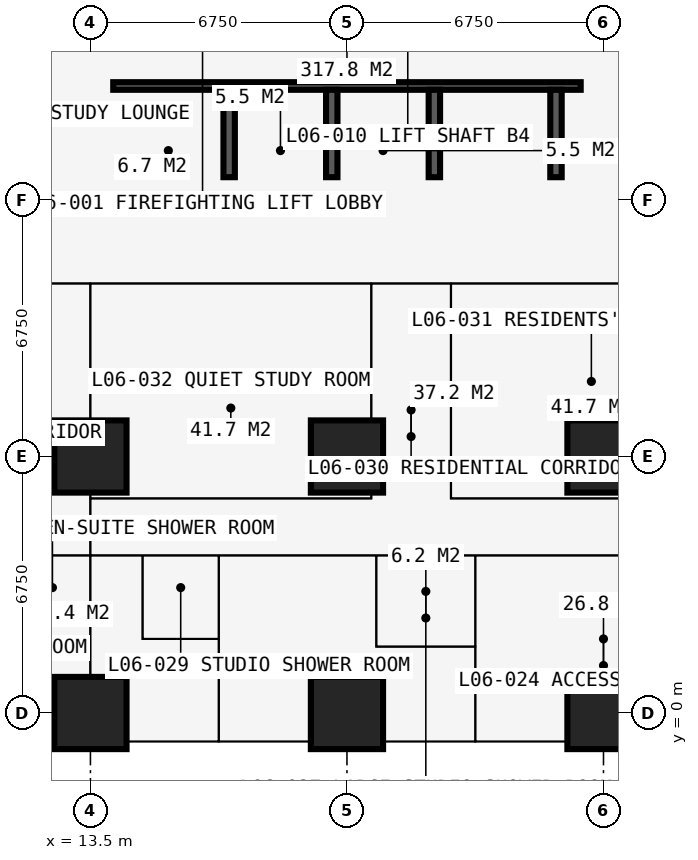
"""IFC4 building model, lengths in metres.
Left out: names, types, materials, properties, quantities, classifications, styles, units other than length and angle.
Written with IfcOpenShell. Run it as: python <this file> out.ifc"""

import sys

from ifc_helpers import new_model, si_unit, direction, frame, frame_2d, origin, origin_2d, place, context, subcontext, project, spatial, rectangle, extrude, element, fill, save


model = new_model("IFC4")
c1 = context("Model", 3, precision=1e-05, world=origin(), true_north=direction((0.0, 1.0)))
c2 = subcontext(c1, "Body", "Model", "MODEL_VIEW")
j1 = project(units=[si_unit("LENGTHUNIT", "METRE"), si_unit("PLANEANGLEUNIT", "RADIAN")], contexts=[c1])
p1 = place(None, origin())
s1 = spatial("IfcSite", under=j1, at=p1, CompositionType="ELEMENT")
p2 = place(p1, origin())
s2 = spatial("IfcBuilding", under=s1, at=p2, CompositionType="ELEMENT")
p3 = place(p2, frame((0.0, 0.0, 25.2)))
s3 = spatial("IfcBuildingStorey", under=s2, at=p3, CompositionType="ELEMENT", Elevation=25.2)
for number, where, z_axis, x_axis in (
    (1, (13.5, 0.0, 0.0), (0.0, 0.0, 1.0), (1.0, 0.0, 0.0)),
    (2, (13.5, 6.75, 0.0), (0.0, 0.0, 1.0), (1.0, 0.0, 0.0)),
    (3, (20.25, 0.0, 0.0), (0.0, 0.0, 1.0), (1.0, 0.0, 0.0)),
    (4, (20.25, 6.75, 0.0), (0.0, 0.0, 1.0), (1.0, 0.0, 0.0)),
    (5, (27.0, 0.0, 0.0), (0.0, 0.0, 1.0), (1.0, 0.0, 0.0)),
    (6, (27.0, 6.75, 0.0), (0.0, 0.0, 1.0), (1.0, 0.0, 0.0)),
):
    element("IfcColumn", number, at=place(p3, frame(where, z_axis=z_axis, x_axis=x_axis)), inside=s3, PredefinedType="COLUMN", context=c2, shape_type="SweptSolid", body=[
        extrude(rectangle(XDim=1.9, YDim=1.9, at=origin_2d()), origin(), (0.0, 0.0, 1.0), 3.6),
    ])
p4 = place(p3, frame((12.9, 13.5, 0.0), z_axis=(0.0, 0.0, 1.0), x_axis=(1.0, 0.0, 0.0)))
e7 = element("IfcWall", 7, at=p4, inside=s3, PredefinedType="SHEAR", context=c2, shape_type="SweptSolid", body=[
    extrude(rectangle(XDim=14.7, YDim=1.2, at=frame_2d((7.35, 0.0))), origin(), (0.0, 0.0, 1.0), 3.6),
])
p5 = place(p3, frame((27.0, 14.1, 0.0), z_axis=(0.0, 0.0, 1.0), x_axis=(0.0, 1.0, 0.0)))
e8 = element("IfcWall", 8, at=p5, inside=s3, PredefinedType="SHEAR", context=c2, shape_type="SweptSolid", body=[
    extrude(rectangle(XDim=12.3, YDim=1.2, at=frame_2d((6.15, 0.0))), origin(), (0.0, 0.0, 1.0), 3.6),
])
p6 = place(p5, frame((3.65, 0.0, 0.0)))
e9 = element("IfcOpeningElement", 9, at=p6, cuts=e8, PredefinedType="OPENING", context=c2, shape_type="SweptSolid", body=[
    extrude(rectangle(XDim=1.2, YDim=2.2, at=frame_2d((0.6, 1.1))), frame((0.0, 0.61, 0.0), z_axis=(0.0, -1.0, 0.0), x_axis=(1.0, 0.0, 0.0)), (0.0, 0.0, 1.0), 1.22),
])
p7 = place(p3, frame((13.5, 26.4, 0.0), z_axis=(0.0, 0.0, 1.0), x_axis=(0.0, -1.0, 0.0)))
e10 = element("IfcWall", 10, at=p7, inside=s3, PredefinedType="SHEAR", context=c2, shape_type="SweptSolid", body=[
    extrude(rectangle(XDim=12.3, YDim=1.2, at=frame_2d((6.15, 0.0))), origin(), (0.0, 0.0, 1.0), 3.6),
])
p8 = place(p7, frame((7.45, 0.0, 0.0)))
e11 = element("IfcOpeningElement", 11, at=p8, cuts=e10, PredefinedType="OPENING", context=c2, shape_type="SweptSolid", body=[
    extrude(rectangle(XDim=1.2, YDim=2.2, at=frame_2d((0.6, 1.1))), frame((0.0, 0.61, 0.0), z_axis=(0.0, -1.0, 0.0), x_axis=(1.0, 0.0, 0.0)), (0.0, 0.0, 1.0), 1.22),
])
p9 = place(p3, frame((20.25, -0.75, 0.0), z_axis=(0.0, 0.0, 1.0), x_axis=(-1.0, 0.0, 0.0)))
e12 = element("IfcWall", 12, at=p9, inside=s3, PredefinedType="SOLIDWALL", context=c2, shape_type="SweptSolid", body=[
    extrude(rectangle(XDim=6.75, YDim=0.15, at=frame_2d((3.375, 0.0))), origin(), (0.0, 0.0, 1.0), 3.375),
])
p10 = place(p9, frame((0.996, 0.0, 0.0)))
e13 = element("IfcOpeningElement", 13, at=p10, cuts=e12, PredefinedType="OPENING", context=c2, shape_type="SweptSolid", body=[
    extrude(rectangle(XDim=1.0, YDim=2.2, at=frame_2d((0.5, 1.1))), frame((0.0, 0.085, 0.0), z_axis=(0.0, -1.0, 0.0), x_axis=(1.0, 0.0, 0.0)), (0.0, 0.0, 1.0), 0.17),
])
p11 = place(p9, frame((2.042, 0.0, 0.9)))
e14 = element("IfcOpeningElement", 14, at=p11, cuts=e12, PredefinedType="OPENING", context=c2, shape_type="SweptSolid", body=[
    extrude(rectangle(XDim=1.2, YDim=1.8, at=frame_2d((0.6, 0.9))), frame((0.0, 0.085, 0.0), z_axis=(0.0, -1.0, 0.0), x_axis=(1.0, 0.0, 0.0)), (0.0, 0.0, 1.0), 0.17),
])
p12 = place(p9, frame((4.754, 0.0, 0.0)))
e15 = element("IfcOpeningElement", 15, at=p12, cuts=e12, PredefinedType="OPENING", context=c2, shape_type="SweptSolid", body=[
    extrude(rectangle(XDim=1.0, YDim=2.2, at=frame_2d((0.5, 1.1))), frame((0.0, 0.085, 0.0), z_axis=(0.0, -1.0, 0.0), x_axis=(1.0, 0.0, 0.0)), (0.0, 0.0, 1.0), 0.17),
])
p13 = place(p9, frame((3.508, 0.0, 0.9)))
e16 = element("IfcOpeningElement", 16, at=p13, cuts=e12, PredefinedType="OPENING", context=c2, shape_type="SweptSolid", body=[
    extrude(rectangle(XDim=1.2, YDim=1.8, at=frame_2d((0.6, 0.9))), frame((0.0, 0.085, 0.0), z_axis=(0.0, -1.0, 0.0), x_axis=(1.0, 0.0, 0.0)), (0.0, 0.0, 1.0), 0.17),
])
p14 = place(p3, frame((16.875, -0.85, 0.0), z_axis=(0.0, 0.0, 1.0), x_axis=(0.0, -1.0, 0.0)))
e17 = element("IfcWall", 17, at=p14, inside=s3, PredefinedType="USERDEFINED", context=c2, shape_type="SweptSolid", body=[
    extrude(rectangle(XDim=2.2, YDim=1.0, at=frame_2d((1.1, 0.0))), origin(), (0.0, 0.0, 1.0), 0.9),
])
p15 = place(p3, frame((14.1, 16.5, 0.0), z_axis=(0.0, 0.0, 1.0), x_axis=(1.0, 0.0, 0.0)))
e18 = element("IfcWall", 18, at=p15, inside=s3, PredefinedType="SHEAR", context=c2, shape_type="SweptSolid", body=[
    extrude(rectangle(XDim=12.3, YDim=0.2, at=frame_2d((6.15, 0.0))), origin(), (0.0, 0.0, 1.0), 3.6),
])
p16 = place(p15, frame((0.9, 0.0, 0.0)))
e19 = element("IfcOpeningElement", 19, at=p16, cuts=e18, PredefinedType="OPENING", context=c2, shape_type="SweptSolid", body=[
    extrude(rectangle(XDim=1.1, YDim=2.2, at=frame_2d((0.55, 1.1))), frame((0.0, 0.11, 0.0), z_axis=(0.0, -1.0, 0.0), x_axis=(1.0, 0.0, 0.0)), (0.0, 0.0, 1.0), 0.22),
])
p17 = place(p15, frame((9.5, 0.0, 0.0)))
e20 = element("IfcOpeningElement", 20, at=p17, cuts=e18, PredefinedType="OPENING", context=c2, shape_type="SweptSolid", body=[
    extrude(rectangle(XDim=1.1, YDim=2.2, at=frame_2d((0.55, 1.1))), frame((0.0, 0.11, 0.0), z_axis=(0.0, -1.0, 0.0), x_axis=(1.0, 0.0, 0.0)), (0.0, 0.0, 1.0), 0.22),
])
for number, where, z_axis, x_axis in (
    (21, (17.15, 14.1, 0.0), (0.0, 0.0, 1.0), (0.0, 1.0, 0.0)),
    (22, (19.85, 14.1, 0.0), (0.0, 0.0, 1.0), (0.0, 1.0, 0.0)),
    (23, (22.55, 14.1, 0.0), (0.0, 0.0, 1.0), (0.0, 1.0, 0.0)),
    (24, (25.75, 14.1, 0.0), (0.0, 0.0, 1.0), (0.0, 1.0, 0.0)),
):
    element("IfcWall", number, at=place(p3, frame(where, z_axis=z_axis, x_axis=x_axis)), inside=s3, PredefinedType="SHEAR", context=c2, shape_type="SweptSolid", body=[
        extrude(rectangle(XDim=2.3, YDim=0.3, at=frame_2d((1.15, 0.0))), origin(), (0.0, 0.0, 1.0), 3.6),
    ])
p18 = place(p3, frame((18.875, 16.6, 0.0), z_axis=(0.0, 0.0, 1.0), x_axis=(0.0, 1.0, 0.0)))
e25 = element("IfcWall", 25, at=p18, inside=s3, PredefinedType="PARTITIONING", context=c2, shape_type="SweptSolid", body=[
    extrude(rectangle(XDim=3.5, YDim=0.15, at=frame_2d((1.75, 0.0))), origin(), (0.0, 0.0, 1.0), 3.375),
])
p19 = place(p18, frame((1.15, 0.0, 0.0)))
e26 = element("IfcOpeningElement", 26, at=p19, cuts=e25, PredefinedType="OPENING", context=c2, shape_type="SweptSolid", body=[
    extrude(rectangle(XDim=1.2, YDim=2.2, at=frame_2d((0.6, 1.1))), frame((0.0, 0.085, 0.0), z_axis=(0.0, -1.0, 0.0), x_axis=(1.0, 0.0, 0.0)), (0.0, 0.0, 1.0), 0.17),
])
p20 = place(p3, frame((21.625, 16.6, 0.0), z_axis=(0.0, 0.0, 1.0), x_axis=(0.0, 1.0, 0.0)))
e27 = element("IfcWall", 27, at=p20, inside=s3, PredefinedType="PARTITIONING", context=c2, shape_type="SweptSolid", body=[
    extrude(rectangle(XDim=3.5, YDim=0.15, at=frame_2d((1.75, 0.0))), origin(), (0.0, 0.0, 1.0), 3.375),
])
p21 = place(p20, frame((1.15, 0.0, 0.0)))
e28 = element("IfcOpeningElement", 28, at=p21, cuts=e27, PredefinedType="OPENING", context=c2, shape_type="SweptSolid", body=[
    extrude(rectangle(XDim=1.2, YDim=2.2, at=frame_2d((0.6, 1.1))), frame((0.0, 0.085, 0.0), z_axis=(0.0, -1.0, 0.0), x_axis=(1.0, 0.0, 0.0)), (0.0, 0.0, 1.0), 0.17),
])
p22 = place(p3, frame((20.38, 16.6, 0.0), z_axis=(0.0, 0.0, 1.0), x_axis=(0.0, 1.0, 0.0)))
e29 = element("IfcWall", 29, at=p22, inside=s3, PredefinedType="PARTITIONING", context=c2, shape_type="SweptSolid", body=[
    extrude(rectangle(XDim=3.5, YDim=0.15, at=frame_2d((1.75, 0.0))), origin(), (0.0, 0.0, 1.0), 3.375),
])
p23 = place(p3, frame((6.75, 4.15, 0.0), z_axis=(0.0, 0.0, 1.0), x_axis=(1.0, 0.0, 0.0)))
e30 = element("IfcWall", 30, at=p23, inside=s3, PredefinedType="PARTITIONING", context=c2, shape_type="SweptSolid", body=[
    extrude(rectangle(XDim=23.625, YDim=0.15, at=frame_2d((11.812, 0.0))), origin(), (0.0, 0.0, 1.0), 3.375),
])
p24 = place(p23, frame((0.2, 0.0, 0.0)))
e31 = element("IfcOpeningElement", 31, at=p24, cuts=e30, PredefinedType="OPENING", context=c2, shape_type="SweptSolid", body=[
    extrude(rectangle(XDim=0.95, YDim=2.2, at=frame_2d((0.475, 1.1))), frame((0.0, 0.085, 0.0), z_axis=(0.0, -1.0, 0.0), x_axis=(1.0, 0.0, 0.0)), (0.0, 0.0, 1.0), 0.17),
])
p25 = place(p23, frame((3.625, 0.0, 0.0)))
e32 = element("IfcOpeningElement", 32, at=p25, cuts=e30, PredefinedType="OPENING", context=c2, shape_type="SweptSolid", body=[
    extrude(rectangle(XDim=0.95, YDim=2.2, at=frame_2d((0.475, 1.1))), frame((0.0, 0.085, 0.0), z_axis=(0.0, -1.0, 0.0), x_axis=(1.0, 0.0, 0.0)), (0.0, 0.0, 1.0), 0.17),
])
p26 = place(p23, frame((18.475, 0.0, 0.0)))
e33 = element("IfcOpeningElement", 33, at=p26, cuts=e30, PredefinedType="OPENING", context=c2, shape_type="SweptSolid", body=[
    extrude(rectangle(XDim=0.95, YDim=2.2, at=frame_2d((0.475, 1.1))), frame((0.0, 0.085, 0.0), z_axis=(0.0, -1.0, 0.0), x_axis=(1.0, 0.0, 0.0)), (0.0, 0.0, 1.0), 0.17),
])
p27 = place(p23, frame((11.725, 0.0, 0.0)))
e34 = element("IfcOpeningElement", 34, at=p27, cuts=e30, PredefinedType="OPENING", context=c2, shape_type="SweptSolid", body=[
    extrude(rectangle(XDim=0.95, YDim=2.2, at=frame_2d((0.475, 1.1))), frame((0.0, 0.085, 0.0), z_axis=(0.0, -1.0, 0.0), x_axis=(1.0, 0.0, 0.0)), (0.0, 0.0, 1.0), 0.17),
])
p28 = place(p23, frame((6.95, 0.0, 0.0)))
e35 = element("IfcOpeningElement", 35, at=p28, cuts=e30, PredefinedType="OPENING", context=c2, shape_type="SweptSolid", body=[
    extrude(rectangle(XDim=0.95, YDim=2.2, at=frame_2d((0.475, 1.1))), frame((0.0, 0.085, 0.0), z_axis=(0.0, -1.0, 0.0), x_axis=(1.0, 0.0, 0.0)), (0.0, 0.0, 1.0), 0.17),
])
p29 = place(p3, frame((10.125, 11.3, 0.0), z_axis=(0.0, 0.0, 1.0), x_axis=(1.0, 0.0, 0.0)))
e36 = element("IfcWall", 36, at=p29, inside=s3, PredefinedType="PARTITIONING", context=c2, shape_type="SweptSolid", body=[
    extrude(rectangle(XDim=20.675, YDim=0.15, at=frame_2d((10.337, 0.0))), origin(), (0.0, 0.0, 1.0), 3.375),
])
p30 = place(p29, frame((1.775, 0.0, 0.0)))
e37 = element("IfcOpeningElement", 37, at=p30, cuts=e36, PredefinedType="OPENING", context=c2, shape_type="SweptSolid", body=[
    extrude(rectangle(XDim=1.0, YDim=2.2, at=frame_2d((0.5, 1.1))), frame((0.0, 0.085, 0.0), z_axis=(0.0, -1.0, 0.0), x_axis=(1.0, 0.0, 0.0)), (0.0, 0.0, 1.0), 0.17),
])
p31 = place(p29, frame((11.312, 0.0, 0.0)))
e38 = element("IfcOpeningElement", 38, at=p31, cuts=e36, PredefinedType="OPENING", context=c2, shape_type="SweptSolid", body=[
    extrude(rectangle(XDim=1.0, YDim=2.2, at=frame_2d((0.5, 1.1))), frame((0.0, 0.085, 0.0), z_axis=(0.0, -1.0, 0.0), x_axis=(1.0, 0.0, 0.0)), (0.0, 0.0, 1.0), 0.17),
])
p32 = place(p3, frame((11.5, 1.95, 0.0), z_axis=(0.0, 0.0, 1.0), x_axis=(1.0, 0.0, 0.0)))
e39 = element("IfcWall", 39, at=p32, inside=s3, PredefinedType="PARTITIONING", context=c2, shape_type="SweptSolid", body=[
    extrude(rectangle(XDim=2.0, YDim=0.1, at=frame_2d((1.0, 0.0))), origin(), (0.0, 0.0, 1.0), 3.375),
])
p33 = place(p3, frame((13.5, -0.734, 0.0), z_axis=(0.0, 0.0, 1.0), x_axis=(0.0, 1.0, 0.0)))
e40 = element("IfcWall", 40, at=p33, inside=s3, PredefinedType="PARTITIONING", context=c2, shape_type="SweptSolid", body=[
    extrude(rectangle(XDim=12.034, YDim=0.15, at=frame_2d((6.017, 0.0))), origin(), (0.0, 0.0, 1.0), 2.877),
])
p34 = place(p3, frame((13.5, 5.65, 0.0), z_axis=(0.0, 0.0, 1.0), x_axis=(1.0, 0.0, 0.0)))
e41 = element("IfcWall", 41, at=p34, inside=s3, PredefinedType="PARTITIONING", context=c2, shape_type="SweptSolid", body=[
    extrude(rectangle(XDim=7.387, YDim=0.15, at=frame_2d((3.694, 0.0))), origin(), (0.0, 0.0, 1.0), 3.375),
])
p35 = place(p34, frame((3.2, 0.0, 0.0)))
e42 = element("IfcOpeningElement", 42, at=p35, cuts=e41, PredefinedType="OPENING", context=c2, shape_type="SweptSolid", body=[
    extrude(rectangle(XDim=0.95, YDim=2.2, at=frame_2d((0.475, 1.1))), frame((0.0, 0.085, 0.0), z_axis=(0.0, -1.0, 0.0), x_axis=(1.0, 0.0, 0.0)), (0.0, 0.0, 1.0), 0.17),
])
p36 = place(p3, frame((14.875, 1.95, 0.0), z_axis=(0.0, 0.0, 1.0), x_axis=(0.0, 1.0, 0.0)))
e43 = element("IfcWall", 43, at=p36, inside=s3, PredefinedType="PARTITIONING", context=c2, shape_type="SweptSolid", body=[
    extrude(rectangle(XDim=2.2, YDim=0.1, at=frame_2d((1.1, 0.0))), origin(), (0.0, 0.0, 1.0), 3.375),
])
p37 = place(p3, frame((14.875, 1.95, 0.0), z_axis=(0.0, 0.0, 1.0), x_axis=(1.0, 0.0, 0.0)))
e44 = element("IfcWall", 44, at=p37, inside=s3, PredefinedType="PARTITIONING", context=c2, shape_type="SweptSolid", body=[
    extrude(rectangle(XDim=2.0, YDim=0.1, at=frame_2d((1.0, 0.0))), origin(), (0.0, 0.0, 1.0), 3.375),
])
p38 = place(p3, frame((16.875, -0.734, 0.0), z_axis=(0.0, 0.0, 1.0), x_axis=(0.0, 1.0, 0.0)))
e45 = element("IfcWall", 45, at=p38, inside=s3, PredefinedType="PARTITIONING", context=c2, shape_type="SweptSolid", body=[
    extrude(rectangle(XDim=4.884, YDim=0.175, at=frame_2d((2.442, 0.0))), origin(), (0.0, 0.0, 1.0), 3.375),
])
p39 = place(p38, frame((3.334, 0.0, 0.0)))
e46 = element("IfcOpeningElement", 46, at=p39, cuts=e45, PredefinedType="OPENING", context=c2, shape_type="SweptSolid", body=[
    extrude(rectangle(XDim=0.9, YDim=2.2, at=frame_2d((0.45, 1.1))), frame((0.0, 0.097, 0.0), z_axis=(0.0, -1.0, 0.0), x_axis=(1.0, 0.0, 0.0)), (0.0, 0.0, 1.0), 0.195),
])
p40 = place(p3, frame((20.887, 5.65, 0.0), z_axis=(0.0, 0.0, 1.0), x_axis=(0.0, 1.0, 0.0)))
e47 = element("IfcWall", 47, at=p40, inside=s3, PredefinedType="PARTITIONING", context=c2, shape_type="SweptSolid", body=[
    extrude(rectangle(XDim=5.65, YDim=0.15, at=frame_2d((2.825, 0.0))), origin(), (0.0, 0.0, 1.0), 3.375),
])
p41 = place(p3, frame((21.025, 1.75, 0.0), z_axis=(0.0, 0.0, 1.0), x_axis=(0.0, 1.0, 0.0)))
e48 = element("IfcWall", 48, at=p41, inside=s3, PredefinedType="PARTITIONING", context=c2, shape_type="SweptSolid", body=[
    extrude(rectangle(XDim=2.4, YDim=0.1, at=frame_2d((1.2, 0.0))), origin(), (0.0, 0.0, 1.0), 3.375),
])
p42 = place(p3, frame((21.025, 1.75, 0.0), z_axis=(0.0, 0.0, 1.0), x_axis=(1.0, 0.0, 0.0)))
e49 = element("IfcWall", 49, at=p42, inside=s3, PredefinedType="PARTITIONING", context=c2, shape_type="SweptSolid", body=[
    extrude(rectangle(XDim=2.6, YDim=0.1, at=frame_2d((1.3, 0.0))), origin(), (0.0, 0.0, 1.0), 3.375),
])
p43 = place(p3, frame((22.988, 5.65, 0.0), z_axis=(0.0, 0.0, 1.0), x_axis=(1.0, 0.0, 0.0)))
e50 = element("IfcWall", 50, at=p43, inside=s3, PredefinedType="PARTITIONING", context=c2, shape_type="SweptSolid", body=[
    extrude(rectangle(XDim=7.387, YDim=0.15, at=frame_2d((3.694, 0.0))), origin(), (0.0, 0.0, 1.0), 3.375),
])
p44 = place(p43, frame((2.1, 0.0, 0.0)))
e51 = element("IfcOpeningElement", 51, at=p44, cuts=e50, PredefinedType="OPENING", context=c2, shape_type="SweptSolid", body=[
    extrude(rectangle(XDim=0.95, YDim=2.2, at=frame_2d((0.475, 1.1))), frame((0.0, 0.085, 0.0), z_axis=(0.0, -1.0, 0.0), x_axis=(1.0, 0.0, 0.0)), (0.0, 0.0, 1.0), 0.17),
])
p45 = place(p3, frame((22.988, 5.65, 0.0), z_axis=(0.0, 0.0, 1.0), x_axis=(0.0, 1.0, 0.0)))
e52 = element("IfcWall", 52, at=p45, inside=s3, PredefinedType="PARTITIONING", context=c2, shape_type="SweptSolid", body=[
    extrude(rectangle(XDim=5.65, YDim=0.15, at=frame_2d((2.825, 0.0))), origin(), (0.0, 0.0, 1.0), 3.375),
])
p46 = place(p3, frame((23.625, -0.734, 0.0), z_axis=(0.0, 0.0, 1.0), x_axis=(0.0, 1.0, 0.0)))
e53 = element("IfcWall", 53, at=p46, inside=s3, PredefinedType="PARTITIONING", context=c2, shape_type="SweptSolid", body=[
    extrude(rectangle(XDim=4.884, YDim=0.175, at=frame_2d((2.442, 0.0))), origin(), (0.0, 0.0, 1.0), 3.375),
])
p47 = place(p46, frame((3.234, 0.0, 0.0)))
e54 = element("IfcOpeningElement", 54, at=p47, cuts=e53, PredefinedType="OPENING", context=c2, shape_type="SweptSolid", body=[
    extrude(rectangle(XDim=0.9, YDim=2.2, at=frame_2d((0.45, 1.1))), frame((0.0, 0.097, 0.0), z_axis=(0.0, -1.0, 0.0), x_axis=(1.0, 0.0, 0.0)), (0.0, 0.0, 1.0), 0.195),
])
p48 = place(p10, origin())
e55 = element("IfcDoor", 55, at=p48, inside=s3, OperationType="SINGLE_SWING_LEFT", PredefinedType="DOOR", context=c2, shape_type="SweptSolid", body=[
    extrude(rectangle(XDim=1.0, YDim=2.2, at=frame_2d((0.5, 1.1))), frame((0.0, 0.025, 0.0), z_axis=(0.0, -1.0, 0.0), x_axis=(1.0, 0.0, 0.0)), (0.0, 0.0, 1.0), 0.05),
])
fill(e13, e55)
p49 = place(p11, origin())
e56 = element("IfcWindow", 56, at=p49, inside=s3, PartitioningType="SINGLE_PANEL", PredefinedType="WINDOW", context=c2, shape_type="SweptSolid", body=[
    extrude(rectangle(XDim=1.2, YDim=1.8, at=frame_2d((0.6, 0.9))), frame((0.0, 0.03, 0.0), z_axis=(0.0, -1.0, 0.0), x_axis=(1.0, 0.0, 0.0)), (0.0, 0.0, 1.0), 0.06),
])
fill(e14, e56)
p50 = place(p12, origin())
e57 = element("IfcDoor", 57, at=p50, inside=s3, OperationType="SINGLE_SWING_RIGHT", PredefinedType="DOOR", context=c2, shape_type="SweptSolid", body=[
    extrude(rectangle(XDim=1.0, YDim=2.2, at=frame_2d((0.5, 1.1))), frame((0.0, 0.025, 0.0), z_axis=(0.0, -1.0, 0.0), x_axis=(1.0, 0.0, 0.0)), (0.0, 0.0, 1.0), 0.05),
])
fill(e15, e57)
p51 = place(p13, origin())
e58 = element("IfcWindow", 58, at=p51, inside=s3, PartitioningType="SINGLE_PANEL", PredefinedType="WINDOW", context=c2, shape_type="SweptSolid", body=[
    extrude(rectangle(XDim=1.2, YDim=1.8, at=frame_2d((0.6, 0.9))), frame((0.0, 0.03, 0.0), z_axis=(0.0, -1.0, 0.0), x_axis=(1.0, 0.0, 0.0)), (0.0, 0.0, 1.0), 0.06),
])
fill(e16, e58)
p52 = place(p16, origin())
e59 = element("IfcDoor", 59, at=p52, inside=s3, OperationType="DOUBLE_DOOR_SLIDING", PredefinedType="DOOR", context=c2, shape_type="SweptSolid", body=[
    extrude(rectangle(XDim=1.1, YDim=2.2, at=frame_2d((0.55, 1.1))), frame((0.0, 0.025, 0.0), z_axis=(0.0, -1.0, 0.0), x_axis=(1.0, 0.0, 0.0)), (0.0, 0.0, 1.0), 0.05),
])
fill(e19, e59)
p53 = place(p17, origin())
e60 = element("IfcDoor", 60, at=p53, inside=s3, OperationType="DOUBLE_DOOR_SLIDING", PredefinedType="DOOR", context=c2, shape_type="SweptSolid", body=[
    extrude(rectangle(XDim=1.1, YDim=2.2, at=frame_2d((0.55, 1.1))), frame((0.0, 0.025, 0.0), z_axis=(0.0, -1.0, 0.0), x_axis=(1.0, 0.0, 0.0)), (0.0, 0.0, 1.0), 0.05),
])
fill(e20, e60)
p54 = place(p30, origin())
e61 = element("IfcDoor", 61, at=p54, inside=s3, OperationType="SINGLE_SWING_LEFT", PredefinedType="DOOR", context=c2, shape_type="SweptSolid", body=[
    extrude(rectangle(XDim=1.0, YDim=2.2, at=frame_2d((0.5, 1.1))), frame((0.0, 0.025, 0.0), z_axis=(0.0, -1.0, 0.0), x_axis=(1.0, 0.0, 0.0)), (0.0, 0.0, 1.0), 0.05),
])
fill(e37, e61)
p55 = place(p26, origin())
e62 = element("IfcDoor", 62, at=p55, inside=s3, OperationType="SINGLE_SWING_LEFT", PredefinedType="DOOR", context=c2, shape_type="SweptSolid", body=[
    extrude(rectangle(XDim=0.95, YDim=2.2, at=frame_2d((0.475, 1.1))), frame((0.0, 0.025, 0.0), z_axis=(0.0, -1.0, 0.0), x_axis=(1.0, 0.0, 0.0)), (0.0, 0.0, 1.0), 0.05),
])
fill(e33, e62)
p56 = place(p27, origin())
e63 = element("IfcDoor", 63, at=p56, inside=s3, OperationType="SINGLE_SWING_LEFT", PredefinedType="DOOR", context=c2, shape_type="SweptSolid", body=[
    extrude(rectangle(XDim=0.95, YDim=2.2, at=frame_2d((0.475, 1.1))), frame((0.0, 0.025, 0.0), z_axis=(0.0, -1.0, 0.0), x_axis=(1.0, 0.0, 0.0)), (0.0, 0.0, 1.0), 0.05),
])
fill(e34, e63)
p57 = place(p47, origin())
e64 = element("IfcDoor", 64, at=p57, inside=s3, OperationType="SINGLE_SWING_RIGHT", PredefinedType="DOOR", context=c2, shape_type="SweptSolid", body=[
    extrude(rectangle(XDim=0.9, YDim=2.2, at=frame_2d((0.45, 1.1))), frame((0.0, 0.025, 0.0), z_axis=(0.0, -1.0, 0.0), x_axis=(1.0, 0.0, 0.0)), (0.0, 0.0, 1.0), 0.05),
])
fill(e54, e64)
p58 = place(p28, origin())
e65 = element("IfcDoor", 65, at=p58, inside=s3, OperationType="SINGLE_SWING_LEFT", PredefinedType="DOOR", context=c2, shape_type="SweptSolid", body=[
    extrude(rectangle(XDim=0.95, YDim=2.2, at=frame_2d((0.475, 1.1))), frame((0.0, 0.025, 0.0), z_axis=(0.0, -1.0, 0.0), x_axis=(1.0, 0.0, 0.0)), (0.0, 0.0, 1.0), 0.05),
])
fill(e35, e65)
p59 = place(p39, origin())
e66 = element("IfcDoor", 66, at=p59, inside=s3, OperationType="SINGLE_SWING_RIGHT", PredefinedType="DOOR", context=c2, shape_type="SweptSolid", body=[
    extrude(rectangle(XDim=0.9, YDim=2.2, at=frame_2d((0.45, 1.1))), frame((0.0, 0.025, 0.0), z_axis=(0.0, -1.0, 0.0), x_axis=(1.0, 0.0, 0.0)), (0.0, 0.0, 1.0), 0.05),
])
fill(e46, e66)
p60 = place(p31, origin())
e67 = element("IfcDoor", 67, at=p60, inside=s3, OperationType="SINGLE_SWING_LEFT", PredefinedType="DOOR", context=c2, shape_type="SweptSolid", body=[
    extrude(rectangle(XDim=1.0, YDim=2.2, at=frame_2d((0.5, 1.1))), frame((0.0, 0.025, 0.0), z_axis=(0.0, -1.0, 0.0), x_axis=(1.0, 0.0, 0.0)), (0.0, 0.0, 1.0), 0.05),
])
fill(e38, e67)
p61 = place(p44, origin())
e68 = element("IfcDoor", 68, at=p61, inside=s3, OperationType="SINGLE_SWING_LEFT", PredefinedType="DOOR", context=c2, shape_type="SweptSolid", body=[
    extrude(rectangle(XDim=0.95, YDim=2.2, at=frame_2d((0.475, 1.1))), frame((0.0, 0.025, 0.0), z_axis=(0.0, -1.0, 0.0), x_axis=(1.0, 0.0, 0.0)), (0.0, 0.0, 1.0), 0.05),
])
fill(e51, e68)
p62 = place(p35, origin())
e69 = element("IfcDoor", 69, at=p62, inside=s3, OperationType="SINGLE_SWING_LEFT", PredefinedType="DOOR", context=c2, shape_type="SweptSolid", body=[
    extrude(rectangle(XDim=0.95, YDim=2.2, at=frame_2d((0.475, 1.1))), frame((0.0, 0.025, 0.0), z_axis=(0.0, -1.0, 0.0), x_axis=(1.0, 0.0, 0.0)), (0.0, 0.0, 1.0), 0.05),
])
fill(e42, e69)
save(model, sys.argv[1])
